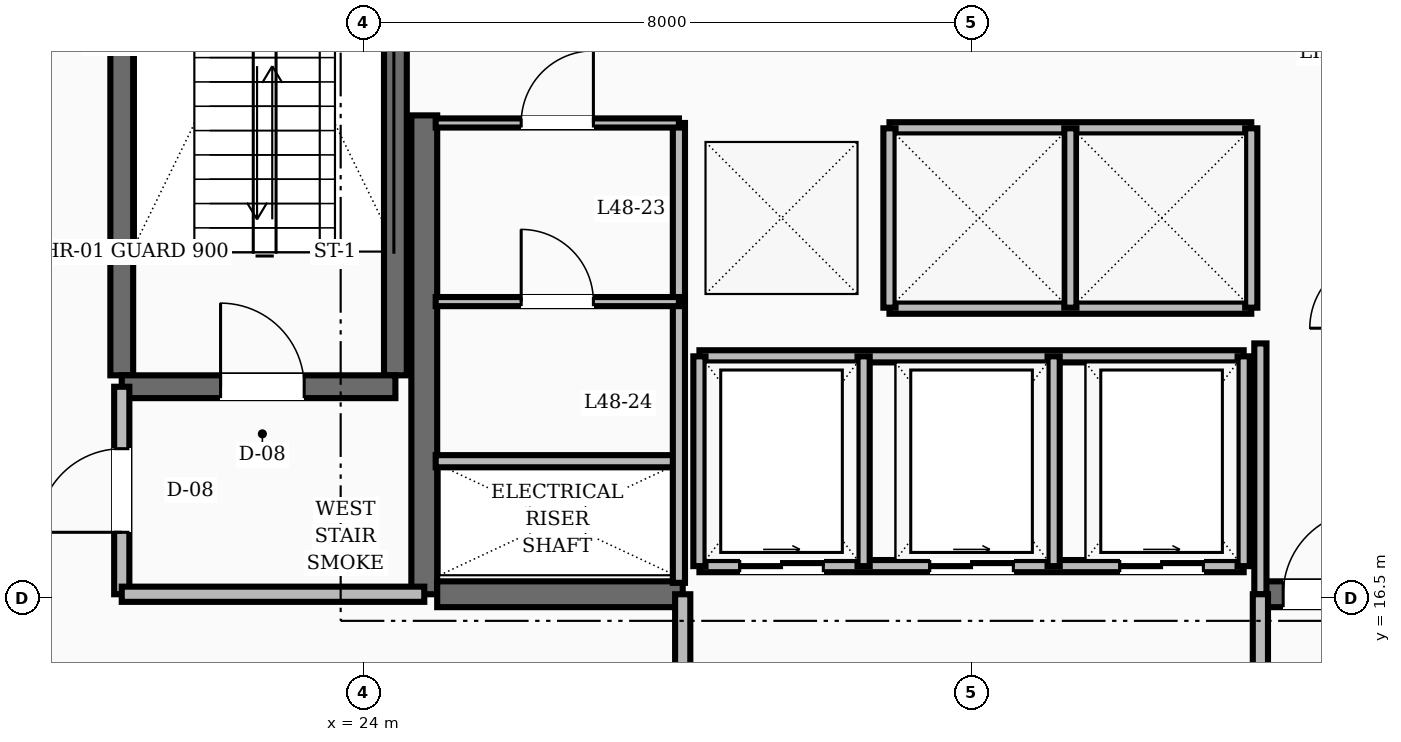
"""IFC4 building model, lengths in metres.
Left out: names, types, materials, properties, quantities, classifications, styles, units other than length and angle.
Written with IfcOpenShell. Run it as: python <this file> out.ifc"""

import sys

from ifc_helpers import new_model, si_unit, direction, frame, frame_2d, origin, place, context, subcontext, project, spatial, rectangle, extrude, element, fill, save


model = new_model("IFC4")
c1 = context("Model", 3, precision=1e-05, world=origin(), true_north=direction((0.0, 1.0)))
c2 = subcontext(c1, "Body", "Model", "MODEL_VIEW")
j1 = project(units=[si_unit("LENGTHUNIT", "METRE"), si_unit("PLANEANGLEUNIT", "RADIAN")], contexts=[c1])
p1 = place(None, origin())
s1 = spatial("IfcSite", under=j1, at=p1, CompositionType="ELEMENT")
p2 = place(p1, origin())
s2 = spatial("IfcBuilding", under=s1, at=p2, CompositionType="ELEMENT")
p3 = place(p2, frame((0.0, 0.0, 185.6)))
s3 = spatial("IfcBuildingStorey", under=s2, at=p3, CompositionType="ELEMENT", Elevation=185.6)
p4 = place(p3, frame((24.8, 16.55, 0.0), z_axis=(0.0, 0.0, 1.0), x_axis=(0.0, 1.0, 0.0)))
e1 = element("IfcWall", 1, at=p4, inside=s3, PredefinedType="SHEAR", context=c2, shape_type="SweptSolid", body=[
    extrude(rectangle(XDim=6.3, YDim=0.34, at=frame_2d((3.15, 0.0))), origin(), (0.0, 0.0, 1.0), 3.6),
])
p5 = place(p3, frame((24.97, 16.55, 0.0), z_axis=(0.0, 0.0, 1.0), x_axis=(1.0, 0.0, 0.0)))
e2 = element("IfcWall", 2, at=p5, inside=s3, PredefinedType="SHEAR", context=c2, shape_type="SweptSolid", body=[
    extrude(rectangle(XDim=3.23, YDim=0.34, at=frame_2d((1.615, 0.0))), origin(), (0.0, 0.0, 1.0), 3.6),
])
p6 = place(p3, frame((35.8, 16.55, 0.0), z_axis=(0.0, 0.0, 1.0), x_axis=(1.0, 0.0, 0.0)))
e3 = element("IfcWall", 3, at=p6, inside=s3, PredefinedType="SHEAR", context=c2, shape_type="SweptSolid", body=[
    extrude(rectangle(XDim=3.23, YDim=0.34, at=frame_2d((1.615, 0.0))), origin(), (0.0, 0.0, 1.0), 3.6),
])
p7 = place(p6, frame((0.3, 0.0, 0.0)))
e4 = element("IfcOpeningElement", 4, at=p7, cuts=e3, PredefinedType="OPENING", context=c2, shape_type="SweptSolid", body=[
    extrude(rectangle(XDim=1.1, YDim=2.1, at=frame_2d((0.55, 1.05))), frame((0.0, 0.18, 0.0), z_axis=(0.0, -1.0, 0.0), x_axis=(1.0, 0.0, 0.0)), (0.0, 0.0, 1.0), 0.36),
])
for number, where, z_axis, x_axis in (
    (5, (20.82, 19.43, 0.0), (0.0, 0.0, 1.0), (0.0, 1.0, 0.0)),
    (6, (24.42, 19.43, 0.0), (0.0, 0.0, 1.0), (0.0, 1.0, 0.0)),
):
    element("IfcWall", number, at=place(p3, frame(where, z_axis=z_axis, x_axis=x_axis)), inside=s3, PredefinedType="SHEAR", context=c2, shape_type="SweptSolid", body=[
        extrude(rectangle(XDim=8.74, YDim=0.3, at=frame_2d((4.37, 0.0))), origin(), (0.0, 0.0, 1.0), 3.6),
    ])
p8 = place(p3, frame((20.82, 19.28, 0.0), z_axis=(0.0, 0.0, 1.0), x_axis=(1.0, 0.0, 0.0)))
e7 = element("IfcWall", 7, at=p8, inside=s3, PredefinedType="SHEAR", context=c2, shape_type="SweptSolid", body=[
    extrude(rectangle(XDim=3.6, YDim=0.3, at=frame_2d((1.8, 0.0))), origin(), (0.0, 0.0, 1.0), 3.6),
])
p9 = place(p8, frame((1.3, 0.0, 0.0)))
e8 = element("IfcOpeningElement", 8, at=p9, cuts=e7, PredefinedType="OPENING", context=c2, shape_type="SweptSolid", body=[
    extrude(rectangle(XDim=1.1, YDim=2.1, at=frame_2d((0.55, 1.05))), frame((0.0, 0.16, 0.0), z_axis=(0.0, -1.0, 0.0), x_axis=(1.0, 0.0, 0.0)), (0.0, 0.0, 1.0), 0.32),
])
p10 = place(p3, frame((20.82, 16.55, 0.0), z_axis=(0.0, 0.0, 1.0), x_axis=(0.0, 1.0, 0.0)))
e9 = element("IfcWall", 9, at=p10, inside=s3, PredefinedType="SOLIDWALL", context=c2, shape_type="SweptSolid", body=[
    extrude(rectangle(XDim=2.73, YDim=0.2, at=frame_2d((1.365, 0.0))), origin(), (0.0, 0.0, 1.0), 2.8),
])
p11 = place(p10, frame((0.815, 0.0, 0.0)))
e10 = element("IfcOpeningElement", 10, at=p11, cuts=e9, PredefinedType="OPENING", context=c2, shape_type="SweptSolid", body=[
    extrude(rectangle(XDim=1.1, YDim=2.1, at=frame_2d((0.55, 1.05))), frame((0.0, 0.11, 0.0), z_axis=(0.0, -1.0, 0.0), x_axis=(1.0, 0.0, 0.0)), (0.0, 0.0, 1.0), 0.22),
])
p12 = place(p3, frame((20.82, 16.55, 0.0), z_axis=(0.0, 0.0, 1.0), x_axis=(1.0, 0.0, 0.0)))
e11 = element("IfcWall", 11, at=p12, inside=s3, PredefinedType="SOLIDWALL", context=c2, shape_type="SweptSolid", body=[
    extrude(rectangle(XDim=3.98, YDim=0.2, at=frame_2d((1.99, 0.0))), origin(), (0.0, 0.0, 1.0), 2.8),
])
p13 = place(p3, frame((35.8, 16.55, 0.0), z_axis=(0.0, 0.0, 1.0), x_axis=(0.0, 1.0, 0.0)))
e12 = element("IfcWall", 12, at=p13, inside=s3, PredefinedType="SOLIDWALL", context=c2, shape_type="SweptSolid", body=[
    extrude(rectangle(XDim=3.3, YDim=0.16, at=frame_2d((1.65, 0.0))), origin(), (0.0, 0.0, 1.0), 2.8),
])
for number, where, z_axis, x_axis in (
    (13, (28.2, 14.35, 0.0), (0.0, 0.0, 1.0), (0.0, 1.0, 0.0)),
    (14, (35.8, 14.35, 0.0), (0.0, 0.0, 1.0), (0.0, 1.0, 0.0)),
):
    element("IfcWall", number, at=place(p3, frame(where, z_axis=z_axis, x_axis=x_axis)), inside=s3, PredefinedType="SOLIDWALL", context=c2, shape_type="SweptSolid", body=[
        extrude(rectangle(XDim=2.2, YDim=0.2, at=frame_2d((1.1, 0.0))), origin(), (0.0, 0.0, 1.0), 2.8),
    ])
for number, where, z_axis, x_axis in (
    (15, (30.92, 22.68, 0.0), (0.0, 0.0, 1.0), (1.0, 0.0, 0.0)),
    (16, (30.92, 20.32, 0.0), (0.0, 0.0, 1.0), (1.0, 0.0, 0.0)),
):
    element("IfcWall", number, at=place(p3, frame(where, z_axis=z_axis, x_axis=x_axis)), inside=s3, PredefinedType="SOLIDWALL", context=c2, shape_type="SweptSolid", body=[
        extrude(rectangle(XDim=4.76, YDim=0.16, at=frame_2d((2.38, 0.0))), origin(), (0.0, 0.0, 1.0), 2.8),
    ])
for number, where, z_axis, x_axis in (
    (17, (30.92, 20.32, 0.0), (0.0, 0.0, 1.0), (0.0, 1.0, 0.0)),
    (18, (33.3, 20.32, 0.0), (0.0, 0.0, 1.0), (0.0, 1.0, 0.0)),
    (19, (35.68, 20.32, 0.0), (0.0, 0.0, 1.0), (0.0, 1.0, 0.0)),
):
    element("IfcWall", number, at=place(p3, frame(where, z_axis=z_axis, x_axis=x_axis)), inside=s3, PredefinedType="SOLIDWALL", context=c2, shape_type="SweptSolid", body=[
        extrude(rectangle(XDim=2.36, YDim=0.16, at=frame_2d((1.18, 0.0))), origin(), (0.0, 0.0, 1.0), 2.8),
    ])
p14 = place(p3, frame((28.42, 16.92, 0.0), z_axis=(0.0, 0.0, 1.0), x_axis=(1.0, 0.0, 0.0)))
e20 = element("IfcWall", 20, at=p14, inside=s3, PredefinedType="SOLIDWALL", context=c2, shape_type="SweptSolid", body=[
    extrude(rectangle(XDim=7.16, YDim=0.16, at=frame_2d((3.58, 0.0))), origin(), (0.0, 0.0, 1.0), 2.8),
])
p15 = place(p14, frame((0.53, 0.0, 0.0)))
e21 = element("IfcOpeningElement", 21, at=p15, cuts=e20, PredefinedType="OPENING", context=c2, shape_type="SweptSolid", body=[
    extrude(rectangle(XDim=1.1, YDim=2.15, at=frame_2d((0.55, 1.075))), frame((0.0, 0.09, 0.0), z_axis=(0.0, -1.0, 0.0), x_axis=(1.0, 0.0, 0.0)), (0.0, 0.0, 1.0), 0.18),
])
p16 = place(p14, frame((3.03, 0.0, 0.0)))
e22 = element("IfcOpeningElement", 22, at=p16, cuts=e20, PredefinedType="OPENING", context=c2, shape_type="SweptSolid", body=[
    extrude(rectangle(XDim=1.1, YDim=2.15, at=frame_2d((0.55, 1.075))), frame((0.0, 0.09, 0.0), z_axis=(0.0, -1.0, 0.0), x_axis=(1.0, 0.0, 0.0)), (0.0, 0.0, 1.0), 0.18),
])
p17 = place(p14, frame((5.53, 0.0, 0.0)))
e23 = element("IfcOpeningElement", 23, at=p17, cuts=e20, PredefinedType="OPENING", context=c2, shape_type="SweptSolid", body=[
    extrude(rectangle(XDim=1.1, YDim=2.15, at=frame_2d((0.55, 1.075))), frame((0.0, 0.09, 0.0), z_axis=(0.0, -1.0, 0.0), x_axis=(1.0, 0.0, 0.0)), (0.0, 0.0, 1.0), 0.18),
])
p18 = place(p3, frame((28.42, 19.68, 0.0), z_axis=(0.0, 0.0, 1.0), x_axis=(1.0, 0.0, 0.0)))
e24 = element("IfcWall", 24, at=p18, inside=s3, PredefinedType="SOLIDWALL", context=c2, shape_type="SweptSolid", body=[
    extrude(rectangle(XDim=7.16, YDim=0.16, at=frame_2d((3.58, 0.0))), origin(), (0.0, 0.0, 1.0), 2.8),
])
for number, where, z_axis, x_axis in (
    (25, (28.42, 16.92, 0.0), (0.0, 0.0, 1.0), (0.0, 1.0, 0.0)),
    (26, (30.58, 16.92, 0.0), (0.0, 0.0, 1.0), (0.0, 1.0, 0.0)),
    (27, (33.08, 16.92, 0.0), (0.0, 0.0, 1.0), (0.0, 1.0, 0.0)),
    (28, (35.58, 16.92, 0.0), (0.0, 0.0, 1.0), (0.0, 1.0, 0.0)),
):
    element("IfcWall", number, at=place(p3, frame(where, z_axis=z_axis, x_axis=x_axis)), inside=s3, PredefinedType="SOLIDWALL", context=c2, shape_type="SweptSolid", body=[
        extrude(rectangle(XDim=2.76, YDim=0.16, at=frame_2d((1.38, 0.0))), origin(), (0.0, 0.0, 1.0), 2.8),
    ])
p19 = place(p3, frame((24.95, 18.3, 0.0), z_axis=(0.0, 0.0, 1.0), x_axis=(1.0, 0.0, 0.0)))
e29 = element("IfcWall", 29, at=p19, inside=s3, PredefinedType="SOLIDWALL", context=c2, shape_type="SweptSolid", body=[
    extrude(rectangle(XDim=3.2, YDim=0.16, at=frame_2d((1.6, 0.0))), origin(), (0.0, 0.0, 1.0), 2.8),
])
p20 = place(p3, frame((28.15, 16.7, 0.0), z_axis=(0.0, 0.0, 1.0), x_axis=(0.0, 1.0, 0.0)))
e30 = element("IfcWall", 30, at=p20, inside=s3, PredefinedType="SOLIDWALL", context=c2, shape_type="SweptSolid", body=[
    extrude(rectangle(XDim=6.05, YDim=0.16, at=frame_2d((3.025, 0.0))), origin(), (0.0, 0.0, 1.0), 2.8),
])
p21 = place(p3, frame((24.95, 22.75, 0.0), z_axis=(0.0, 0.0, 1.0), x_axis=(1.0, 0.0, 0.0)))
e31 = element("IfcWall", 31, at=p21, inside=s3, PredefinedType="PARTITIONING", context=c2, shape_type="SweptSolid", body=[
    extrude(rectangle(XDim=3.2, YDim=0.12, at=frame_2d((1.6, 0.0))), origin(), (0.0, 0.0, 1.0), 2.8),
])
p22 = place(p21, frame((1.125, 0.0, 0.0)))
e32 = element("IfcOpeningElement", 32, at=p22, cuts=e31, PredefinedType="OPENING", context=c2, shape_type="SweptSolid", body=[
    extrude(rectangle(XDim=0.95, YDim=2.1, at=frame_2d((0.475, 1.05))), frame((0.0, 0.07, 0.0), z_axis=(0.0, -1.0, 0.0), x_axis=(1.0, 0.0, 0.0)), (0.0, 0.0, 1.0), 0.14),
])
p23 = place(p3, frame((24.95, 20.4, 0.0), z_axis=(0.0, 0.0, 1.0), x_axis=(1.0, 0.0, 0.0)))
e33 = element("IfcWall", 33, at=p23, inside=s3, PredefinedType="PARTITIONING", context=c2, shape_type="SweptSolid", body=[
    extrude(rectangle(XDim=3.2, YDim=0.12, at=frame_2d((1.6, 0.0))), origin(), (0.0, 0.0, 1.0), 2.8),
])
p24 = place(p23, frame((1.125, 0.0, 0.0)))
e34 = element("IfcOpeningElement", 34, at=p24, cuts=e33, PredefinedType="OPENING", context=c2, shape_type="SweptSolid", body=[
    extrude(rectangle(XDim=0.95, YDim=2.1, at=frame_2d((0.475, 1.05))), frame((0.0, 0.07, 0.0), z_axis=(0.0, -1.0, 0.0), x_axis=(1.0, 0.0, 0.0)), (0.0, 0.0, 1.0), 0.14),
])
p25 = place(p9, origin())
e35 = element("IfcDoor", 35, at=p25, inside=s3, OperationType="SINGLE_SWING_LEFT", PredefinedType="DOOR", context=c2, shape_type="SweptSolid", body=[
    extrude(rectangle(XDim=1.1, YDim=2.1, at=frame_2d((0.55, 1.05))), frame((0.0, 0.025, 0.0), z_axis=(0.0, -1.0, 0.0), x_axis=(1.0, 0.0, 0.0)), (0.0, 0.0, 1.0), 0.05),
])
fill(e8, e35)
p26 = place(p11, origin())
e36 = element("IfcDoor", 36, at=p26, inside=s3, OperationType="SINGLE_SWING_LEFT", PredefinedType="DOOR", context=c2, shape_type="SweptSolid", body=[
    extrude(rectangle(XDim=1.1, YDim=2.1, at=frame_2d((0.55, 1.05))), frame((0.0, 0.025, 0.0), z_axis=(0.0, -1.0, 0.0), x_axis=(1.0, 0.0, 0.0)), (0.0, 0.0, 1.0), 0.05),
])
fill(e10, e36)
p27 = place(p7, origin())
e37 = element("IfcDoor", 37, at=p27, inside=s3, OperationType="SINGLE_SWING_RIGHT", PredefinedType="DOOR", context=c2, shape_type="SweptSolid", body=[
    extrude(rectangle(XDim=1.1, YDim=2.1, at=frame_2d((0.55, 1.05))), frame((0.0, 0.025, 0.0), z_axis=(0.0, -1.0, 0.0), x_axis=(1.0, 0.0, 0.0)), (0.0, 0.0, 1.0), 0.05),
])
fill(e4, e37)
p28 = place(p15, origin())
e38 = element("IfcDoor", 38, at=p28, inside=s3, OperationType="SLIDING_TO_RIGHT", PredefinedType="DOOR", context=c2, shape_type="SweptSolid", body=[
    extrude(rectangle(XDim=1.1, YDim=2.15, at=frame_2d((0.55, 1.075))), frame((0.0, 0.025, 0.0), z_axis=(0.0, -1.0, 0.0), x_axis=(1.0, 0.0, 0.0)), (0.0, 0.0, 1.0), 0.05),
])
fill(e21, e38)
p29 = place(p16, origin())
e39 = element("IfcDoor", 39, at=p29, inside=s3, OperationType="SLIDING_TO_RIGHT", PredefinedType="DOOR", context=c2, shape_type="SweptSolid", body=[
    extrude(rectangle(XDim=1.1, YDim=2.15, at=frame_2d((0.55, 1.075))), frame((0.0, 0.025, 0.0), z_axis=(0.0, -1.0, 0.0), x_axis=(1.0, 0.0, 0.0)), (0.0, 0.0, 1.0), 0.05),
])
fill(e22, e39)
p30 = place(p17, origin())
e40 = element("IfcDoor", 40, at=p30, inside=s3, OperationType="SLIDING_TO_RIGHT", PredefinedType="DOOR", context=c2, shape_type="SweptSolid", body=[
    extrude(rectangle(XDim=1.1, YDim=2.15, at=frame_2d((0.55, 1.075))), frame((0.0, 0.025, 0.0), z_axis=(0.0, -1.0, 0.0), x_axis=(1.0, 0.0, 0.0)), (0.0, 0.0, 1.0), 0.05),
])
fill(e23, e40)
p31 = place(p22, origin())
e41 = element("IfcDoor", 41, at=p31, inside=s3, OperationType="SINGLE_SWING_RIGHT", PredefinedType="DOOR", context=c2, shape_type="SweptSolid", body=[
    extrude(rectangle(XDim=0.95, YDim=2.1, at=frame_2d((0.475, 1.05))), frame((0.0, 0.025, 0.0), z_axis=(0.0, -1.0, 0.0), x_axis=(1.0, 0.0, 0.0)), (0.0, 0.0, 1.0), 0.05),
])
fill(e32, e41)
p32 = place(p24, origin())
e42 = element("IfcDoor", 42, at=p32, inside=s3, OperationType="SINGLE_SWING_LEFT", PredefinedType="DOOR", context=c2, shape_type="SweptSolid", body=[
    extrude(rectangle(XDim=0.95, YDim=2.1, at=frame_2d((0.475, 1.05))), frame((0.0, 0.025, 0.0), z_axis=(0.0, -1.0, 0.0), x_axis=(1.0, 0.0, 0.0)), (0.0, 0.0, 1.0), 0.05),
])
fill(e34, e42)
save(model, sys.argv[1])
